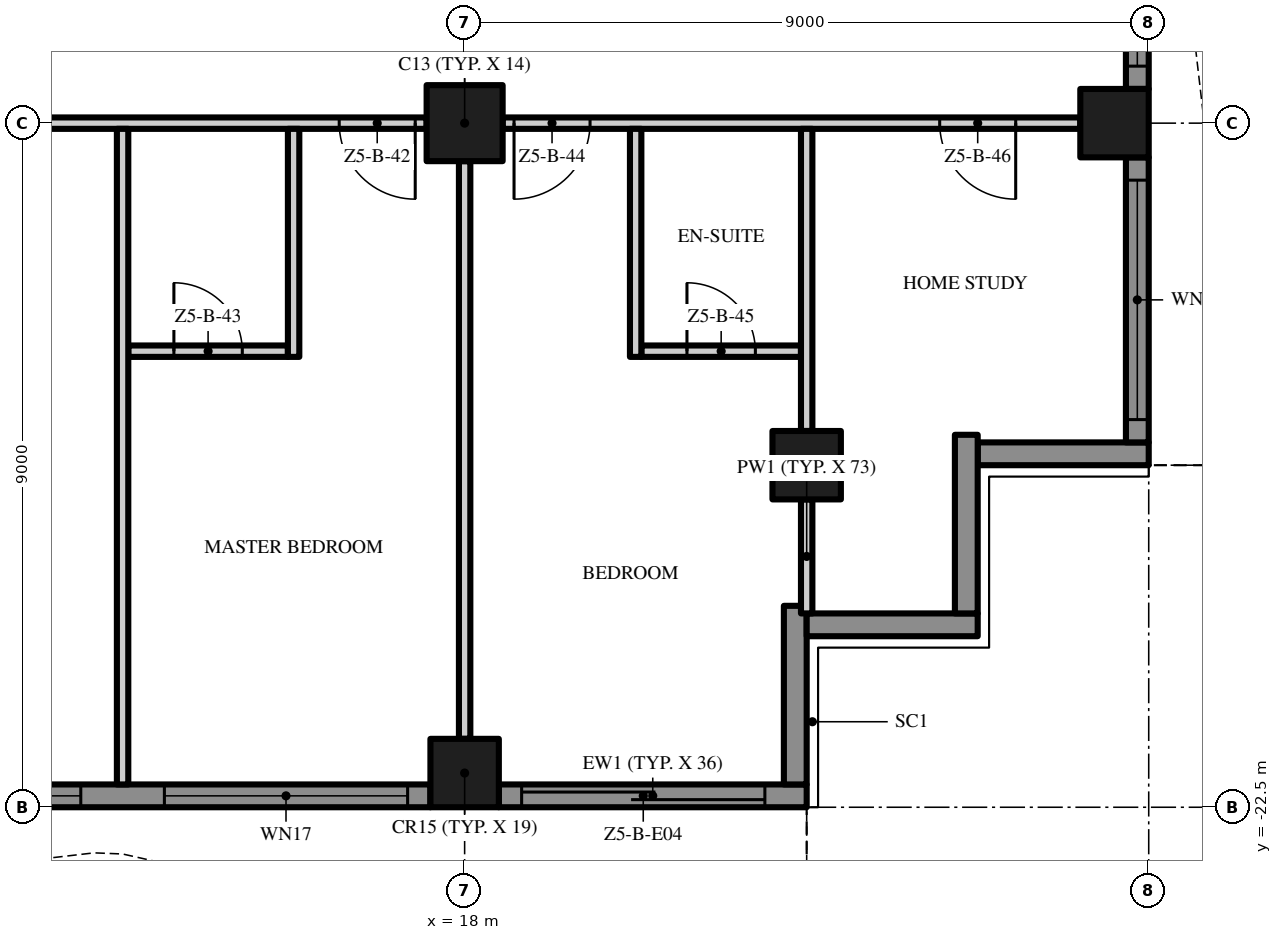
"""IFC4 building model, lengths in metres.
Left out: names, types, materials, properties, quantities, classifications, styles, units other than length and angle.
Written with IfcOpenShell. Run it as: python <this file> out.ifc"""

import sys

from ifc_helpers import new_model, si_unit, direction, frame, frame_2d, origin, origin_2d, place, context, subcontext, project, spatial, polyline, rectangle, outline, extrude, element, fill, save


model = new_model("IFC4")
c1 = context("Model", 3, precision=1e-05, world=origin(), true_north=direction((0.0, 1.0)))
c2 = subcontext(c1, "Body", "Model", "MODEL_VIEW")
j1 = project(units=[si_unit("LENGTHUNIT", "METRE"), si_unit("PLANEANGLEUNIT", "RADIAN")], contexts=[c1])
p1 = place(None, origin())
s1 = spatial("IfcSite", under=j1, at=p1, CompositionType="ELEMENT")
p2 = place(p1, origin())
s2 = spatial("IfcBuilding", under=s1, at=p2, CompositionType="ELEMENT")
p3 = place(p2, frame((0.0, 0.0, 254.0)))
s3 = spatial("IfcBuildingStorey", under=s2, at=p3, CompositionType="ELEMENT", Elevation=254.0)
p4 = place(p3, frame((18.0, -13.5, 0.0), z_axis=(0.0, 0.0, 1.0), x_axis=(1.0, 0.0, 0.0)))
e1 = element("IfcColumn", 1, at=p4, inside=s3, PredefinedType="COLUMN", context=c2, shape_type="SweptSolid", body=[
    extrude(rectangle(XDim=1.0, YDim=1.0, at=origin_2d()), origin(), (0.0, 0.0, 1.0), 3.5),
])
for number, where, z_axis, x_axis in (
    (2, (18.0, -22.05, 0.0), (0.0, 0.0, 1.0), (1.0, 0.0, 0.0)),
    (3, (26.55, -13.5, 0.0), (0.0, 0.0, 1.0), (1.0, 0.0, 0.0)),
    (4, (22.5, -18.0, 0.0), (0.0, 0.0, 1.0), (1.0, 0.0, 0.0)),
):
    element("IfcColumn", number, at=place(p3, frame(where, z_axis=z_axis, x_axis=x_axis)), inside=s3, PredefinedType="COLUMN", context=c2, shape_type="SweptSolid", body=[
        extrude(rectangle(XDim=0.9, YDim=0.9, at=origin_2d()), origin(), (0.0, 0.0, 1.0), 3.5),
    ])
p5 = place(p3, frame((17.55, -22.35, 0.0), z_axis=(0.0, 0.0, 1.0), x_axis=(-1.0, 0.0, 0.0)))
e5 = element("IfcWall", 5, at=p5, inside=s3, PredefinedType="SOLIDWALL", context=c2, shape_type="SweptSolid", body=[
    extrude(rectangle(XDim=8.1, YDim=0.3, at=frame_2d((4.05, 0.0))), origin(), (0.0, 0.0, 1.0), 3.5),
])
p6 = place(p5, frame((4.6, 0.0, 0.45)))
e6 = element("IfcOpeningElement", 6, at=p6, cuts=e5, PredefinedType="OPENING", context=c2, shape_type="SweptSolid", body=[
    extrude(rectangle(XDim=3.2, YDim=2.65, at=frame_2d((1.6, 1.325))), frame((0.0, 0.16, 0.0), z_axis=(0.0, -1.0, 0.0), x_axis=(1.0, 0.0, 0.0)), (0.0, 0.0, 1.0), 0.32),
])
p7 = place(p5, frame((0.3, 0.0, 0.45)))
e7 = element("IfcOpeningElement", 7, at=p7, cuts=e5, PredefinedType="OPENING", context=c2, shape_type="SweptSolid", body=[
    extrude(rectangle(XDim=3.2, YDim=2.65, at=frame_2d((1.6, 1.325))), frame((0.0, 0.16, 0.0), z_axis=(0.0, -1.0, 0.0), x_axis=(1.0, 0.0, 0.0)), (0.0, 0.0, 1.0), 0.32),
])
p8 = place(p3, frame((22.5, -22.35, 0.0), z_axis=(0.0, 0.0, 1.0), x_axis=(-1.0, 0.0, 0.0)))
e8 = element("IfcWall", 8, at=p8, inside=s3, PredefinedType="SOLIDWALL", context=c2, shape_type="SweptSolid", body=[
    extrude(rectangle(XDim=4.05, YDim=0.3, at=frame_2d((2.025, 0.0))), origin(), (0.0, 0.0, 1.0), 3.5),
])
p9 = place(p8, frame((0.55, 0.0, 0.0)))
e9 = element("IfcOpeningElement", 9, at=p9, cuts=e8, PredefinedType="OPENING", context=c2, shape_type="SweptSolid", body=[
    extrude(rectangle(XDim=3.2, YDim=2.4, at=frame_2d((1.6, 1.2))), frame((0.0, 0.16, 0.0), z_axis=(0.0, -1.0, 0.0), x_axis=(1.0, 0.0, 0.0)), (0.0, 0.0, 1.0), 0.32),
])
p10 = place(p3, frame((22.35, -19.85, 0.0), z_axis=(0.0, 0.0, 1.0), x_axis=(0.0, -1.0, 0.0)))
e10 = element("IfcWall", 10, at=p10, inside=s3, PredefinedType="SOLIDWALL", context=c2, shape_type="SweptSolid", body=[
    extrude(rectangle(XDim=2.35, YDim=0.3, at=frame_2d((1.175, 0.0))), origin(), (0.0, 0.0, 1.0), 3.5),
])
p11 = place(p3, frame((24.75, -20.1, 0.0), z_axis=(0.0, 0.0, 1.0), x_axis=(-1.0, 0.0, 0.0)))
e11 = element("IfcWall", 11, at=p11, inside=s3, PredefinedType="SOLIDWALL", context=c2, shape_type="SweptSolid", body=[
    extrude(rectangle(XDim=2.25, YDim=0.3, at=frame_2d((1.125, 0.0))), origin(), (0.0, 0.0, 1.0), 3.5),
])
p12 = place(p3, frame((24.6, -17.6, 0.0), z_axis=(0.0, 0.0, 1.0), x_axis=(0.0, -1.0, 0.0)))
e12 = element("IfcWall", 12, at=p12, inside=s3, PredefinedType="SOLIDWALL", context=c2, shape_type="SweptSolid", body=[
    extrude(rectangle(XDim=2.35, YDim=0.3, at=frame_2d((1.175, 0.0))), origin(), (0.0, 0.0, 1.0), 3.5),
])
p13 = place(p3, frame((27.0, -17.85, 0.0), z_axis=(0.0, 0.0, 1.0), x_axis=(-1.0, 0.0, 0.0)))
e13 = element("IfcWall", 13, at=p13, inside=s3, PredefinedType="SOLIDWALL", context=c2, shape_type="SweptSolid", body=[
    extrude(rectangle(XDim=2.25, YDim=0.3, at=frame_2d((1.125, 0.0))), origin(), (0.0, 0.0, 1.0), 3.5),
])
p14 = place(p3, frame((26.85, -13.95, 0.0), z_axis=(0.0, 0.0, 1.0), x_axis=(0.0, -1.0, 0.0)))
e14 = element("IfcWall", 14, at=p14, inside=s3, PredefinedType="SOLIDWALL", context=c2, shape_type="SweptSolid", body=[
    extrude(rectangle(XDim=3.75, YDim=0.3, at=frame_2d((1.875, 0.0))), origin(), (0.0, 0.0, 1.0), 3.5),
])
p15 = place(p14, frame((0.3, 0.0, 0.45)))
e15 = element("IfcOpeningElement", 15, at=p15, cuts=e14, PredefinedType="OPENING", context=c2, shape_type="SweptSolid", body=[
    extrude(rectangle(XDim=3.15, YDim=2.65, at=frame_2d((1.575, 1.325))), frame((0.0, 0.16, 0.0), z_axis=(0.0, -1.0, 0.0), x_axis=(1.0, 0.0, 0.0)), (0.0, 0.0, 1.0), 0.32),
])
p16 = place(p3, frame((26.85, -4.95, 0.0), z_axis=(0.0, 0.0, 1.0), x_axis=(0.0, -1.0, 0.0)))
e16 = element("IfcWall", 16, at=p16, inside=s3, PredefinedType="SOLIDWALL", context=c2, shape_type="SweptSolid", body=[
    extrude(rectangle(XDim=8.1, YDim=0.3, at=frame_2d((4.05, 0.0))), origin(), (0.0, 0.0, 1.0), 3.5),
])
p17 = place(p16, frame((4.6, 0.0, 0.45)))
e17 = element("IfcOpeningElement", 17, at=p17, cuts=e16, PredefinedType="OPENING", context=c2, shape_type="SweptSolid", body=[
    extrude(rectangle(XDim=3.2, YDim=2.65, at=frame_2d((1.6, 1.325))), frame((0.0, 0.16, 0.0), z_axis=(0.0, -1.0, 0.0), x_axis=(1.0, 0.0, 0.0)), (0.0, 0.0, 1.0), 0.32),
])
p18 = place(p16, frame((0.3, 0.0, 0.0)))
e18 = element("IfcOpeningElement", 18, at=p18, cuts=e16, PredefinedType="OPENING", context=c2, shape_type="SweptSolid", body=[
    extrude(rectangle(XDim=3.2, YDim=2.4, at=frame_2d((1.6, 1.2))), frame((0.0, 0.16, 0.0), z_axis=(0.0, -1.0, 0.0), x_axis=(1.0, 0.0, 0.0)), (0.0, 0.0, 1.0), 0.32),
])
p19 = place(p3, origin())
e19 = element("IfcWall", 19, at=p19, inside=s3, PredefinedType="USERDEFINED", context=c2, shape_type="SweptSolid", body=[
    extrude(outline(polyline([(-22.5, -25.149), (-21.0, -24.488), (-19.5, -23.755), (-18.0, -23.231), (-16.875, -23.1), (-16.5, -23.115), (-15.0, -23.451), (-13.5, -24.112), (-12.0, -24.845), (-10.5, -25.369), (-9.375, -25.5), (-9.0, -25.485), (-7.5, -25.149), (-6.0, -24.488), (-4.5, -23.755), (-3.0, -23.231), (-1.875, -23.1), (-1.5, -23.115), (0.0, -23.451), (1.5, -24.112), (3.0, -24.845), (4.5, -25.369), (5.625, -25.5), (6.0, -25.485), (7.5, -25.149), (9.0, -24.488), (10.5, -23.755), (12.0, -23.231), (13.125, -23.1), (13.5, -23.115), (15.0, -23.451), (16.5, -24.112), (18.0, -24.845), (19.5, -25.369), (20.625, -25.5), (21.0, -25.485), (22.5, -25.149), (22.445, -24.905), (20.967, -25.236), (20.635, -25.249), (19.556, -25.124), (18.096, -24.614), (16.605, -23.885), (15.079, -23.213), (13.533, -22.866), (13.115, -22.849), (11.944, -22.986), (10.404, -23.524), (8.895, -24.261), (7.421, -24.91), (5.967, -25.236), (5.635, -25.249), (4.556, -25.124), (3.096, -24.614), (1.605, -23.885), (0.079, -23.213), (-1.467, -22.866), (-1.885, -22.849), (-3.056, -22.986), (-4.596, -23.524), (-6.105, -24.261), (-7.579, -24.91), (-9.033, -25.236), (-9.365, -25.249), (-10.444, -25.124), (-11.904, -24.614), (-13.395, -23.885), (-14.921, -23.213), (-16.467, -22.866), (-16.885, -22.849), (-18.056, -22.986), (-19.596, -23.524), (-21.105, -24.261), (-22.601, -24.92), (-22.5, -25.149)])), origin(), (0.0, 0.0, 1.0), 0.9),
])
p20 = place(p3, origin())
e20 = element("IfcWall", 20, at=p20, inside=s3, PredefinedType="USERDEFINED", context=c2, shape_type="SweptSolid", body=[
    extrude(outline(polyline([(29.649, -18.0), (28.988, -16.5), (28.255, -15.0), (27.731, -13.5), (27.6, -12.375), (27.615, -12.0), (27.951, -10.5), (28.612, -9.0), (29.345, -7.5), (29.869, -6.0), (30.0, -4.875), (29.985, -4.5), (29.649, -3.0), (28.988, -1.5), (28.255, 0.0), (27.731, 1.5), (27.6, 2.625), (27.615, 3.0), (27.951, 4.5), (28.612, 6.0), (29.345, 7.5), (29.869, 9.0), (30.0, 10.125), (29.985, 10.5), (29.649, 12.0), (28.988, 13.5), (28.255, 15.0), (27.731, 16.5), (27.6, 17.625), (27.615, 18.0), (27.365, 18.01), (27.349, 17.615), (27.486, 16.444), (28.024, 14.904), (28.761, 13.395), (29.41, 11.921), (29.736, 10.467), (29.749, 10.135), (29.624, 9.056), (29.114, 7.596), (28.385, 6.105), (27.713, 4.579), (27.366, 3.033), (27.349, 2.615), (27.486, 1.444), (28.024, -0.096), (28.761, -1.605), (29.41, -3.079), (29.736, -4.533), (29.749, -4.865), (29.624, -5.944), (29.114, -7.404), (28.385, -8.895), (27.713, -10.421), (27.366, -11.967), (27.349, -12.385), (27.486, -13.556), (28.024, -15.096), (28.761, -16.605), (29.42, -18.101), (29.649, -18.0)])), origin(), (0.0, 0.0, 1.0), 0.9),
])
p21 = place(p3, frame((13.575, -16.5, 0.0), z_axis=(0.0, 0.0, 1.0), x_axis=(1.0, 0.0, 0.0)))
e21 = element("IfcWall", 21, at=p21, inside=s3, PredefinedType="PARTITIONING", context=c2, shape_type="SweptSolid", body=[
    extrude(rectangle(XDim=2.1, YDim=0.15, at=frame_2d((1.05, 0.0))), origin(), (0.0, 0.0, 1.0), 3.5),
])
p22 = place(p21, frame((0.6, 0.0, 0.0)))
e22 = element("IfcOpeningElement", 22, at=p22, cuts=e21, PredefinedType="OPENING", context=c2, shape_type="SweptSolid", body=[
    extrude(rectangle(XDim=0.9, YDim=2.1, at=frame_2d((0.45, 1.05))), frame((0.0, 0.085, 0.0), z_axis=(0.0, -1.0, 0.0), x_axis=(1.0, 0.0, 0.0)), (0.0, 0.0, 1.0), 0.17),
])
p23 = place(p3, frame((20.325, -16.5, 0.0), z_axis=(0.0, 0.0, 1.0), x_axis=(1.0, 0.0, 0.0)))
e23 = element("IfcWall", 23, at=p23, inside=s3, PredefinedType="PARTITIONING", context=c2, shape_type="SweptSolid", body=[
    extrude(rectangle(XDim=2.1, YDim=0.15, at=frame_2d((1.05, 0.0))), origin(), (0.0, 0.0, 1.0), 3.5),
])
p24 = place(p23, frame((0.6, 0.0, 0.0)))
e24 = element("IfcOpeningElement", 24, at=p24, cuts=e23, PredefinedType="OPENING", context=c2, shape_type="SweptSolid", body=[
    extrude(rectangle(XDim=0.9, YDim=2.1, at=frame_2d((0.45, 1.05))), frame((0.0, 0.085, 0.0), z_axis=(0.0, -1.0, 0.0), x_axis=(1.0, 0.0, 0.0)), (0.0, 0.0, 1.0), 0.17),
])
p25 = place(p3, frame((17.5, -13.5, 0.0), z_axis=(0.0, 0.0, 1.0), x_axis=(-1.0, 0.0, 0.0)))
e25 = element("IfcWall", 25, at=p25, inside=s3, PredefinedType="PARTITIONING", context=c2, shape_type="SweptSolid", body=[
    extrude(rectangle(XDim=8.0, YDim=0.15, at=frame_2d((4.0, 0.0))), origin(), (0.0, 0.0, 1.0), 3.5),
])
p26 = place(p25, frame((6.05, 0.0, 0.0)))
e26 = element("IfcOpeningElement", 26, at=p26, cuts=e25, PredefinedType="OPENING", context=c2, shape_type="SweptSolid", body=[
    extrude(rectangle(XDim=1.8, YDim=2.4, at=frame_2d((0.9, 1.2))), frame((0.0, 0.085, 0.0), z_axis=(0.0, -1.0, 0.0), x_axis=(1.0, 0.0, 0.0)), (0.0, 0.0, 1.0), 0.17),
])
p27 = place(p25, frame((0.15, 0.0, 0.0)))
e27 = element("IfcOpeningElement", 27, at=p27, cuts=e25, PredefinedType="OPENING", context=c2, shape_type="SweptSolid", body=[
    extrude(rectangle(XDim=1.0, YDim=2.4, at=frame_2d((0.5, 1.2))), frame((0.0, 0.085, 0.0), z_axis=(0.0, -1.0, 0.0), x_axis=(1.0, 0.0, 0.0)), (0.0, 0.0, 1.0), 0.17),
])
p28 = place(p3, frame((26.1, -13.5, 0.0), z_axis=(0.0, 0.0, 1.0), x_axis=(-1.0, 0.0, 0.0)))
e28 = element("IfcWall", 28, at=p28, inside=s3, PredefinedType="PARTITIONING", context=c2, shape_type="SweptSolid", body=[
    extrude(rectangle(XDim=7.6, YDim=0.15, at=frame_2d((3.8, 0.0))), origin(), (0.0, 0.0, 1.0), 3.5),
])
p29 = place(p28, frame((6.45, 0.0, 0.0)))
e29 = element("IfcOpeningElement", 29, at=p29, cuts=e28, PredefinedType="OPENING", context=c2, shape_type="SweptSolid", body=[
    extrude(rectangle(XDim=1.0, YDim=2.4, at=frame_2d((0.5, 1.2))), frame((0.0, 0.085, 0.0), z_axis=(0.0, -1.0, 0.0), x_axis=(1.0, 0.0, 0.0)), (0.0, 0.0, 1.0), 0.17),
])
p30 = place(p28, frame((0.85, 0.0, 0.0)))
e30 = element("IfcOpeningElement", 30, at=p30, cuts=e28, PredefinedType="OPENING", context=c2, shape_type="SweptSolid", body=[
    extrude(rectangle(XDim=1.0, YDim=2.4, at=frame_2d((0.5, 1.2))), frame((0.0, 0.085, 0.0), z_axis=(0.0, -1.0, 0.0), x_axis=(1.0, 0.0, 0.0)), (0.0, 0.0, 1.0), 0.17),
])
p31 = place(p3, frame((13.5, -22.2, 0.0), z_axis=(0.0, 0.0, 1.0), x_axis=(0.0, 1.0, 0.0)))
e31 = element("IfcWall", 31, at=p31, inside=s3, PredefinedType="PARTITIONING", context=c2, shape_type="SweptSolid", body=[
    extrude(rectangle(XDim=8.625, YDim=0.15, at=frame_2d((4.312, 0.0))), origin(), (0.0, 0.0, 1.0), 3.5),
])
p32 = place(p3, frame((15.75, -16.575, 0.0), z_axis=(0.0, 0.0, 1.0), x_axis=(0.0, 1.0, 0.0)))
e32 = element("IfcWall", 32, at=p32, inside=s3, PredefinedType="PARTITIONING", context=c2, shape_type="SweptSolid", body=[
    extrude(rectangle(XDim=3.0, YDim=0.15, at=frame_2d((1.5, 0.0))), origin(), (0.0, 0.0, 1.0), 3.5),
])
p33 = place(p3, frame((18.0, -21.6, 0.0), z_axis=(0.0, 0.0, 1.0), x_axis=(0.0, 1.0, 0.0)))
e33 = element("IfcWall", 33, at=p33, inside=s3, PredefinedType="PARTITIONING", context=c2, shape_type="SweptSolid", body=[
    extrude(rectangle(XDim=7.6, YDim=0.15, at=frame_2d((3.8, 0.0))), origin(), (0.0, 0.0, 1.0), 3.5),
])
p34 = place(p3, frame((20.25, -16.575, 0.0), z_axis=(0.0, 0.0, 1.0), x_axis=(0.0, 1.0, 0.0)))
e34 = element("IfcWall", 34, at=p34, inside=s3, PredefinedType="PARTITIONING", context=c2, shape_type="SweptSolid", body=[
    extrude(rectangle(XDim=3.0, YDim=0.15, at=frame_2d((1.5, 0.0))), origin(), (0.0, 0.0, 1.0), 3.5),
])
p35 = place(p3, frame((22.5, -19.95, 0.0), z_axis=(0.0, 0.0, 1.0), x_axis=(0.0, 1.0, 0.0)))
e35 = element("IfcWall", 35, at=p35, inside=s3, PredefinedType="PARTITIONING", context=c2, shape_type="SweptSolid", body=[
    extrude(rectangle(XDim=1.5, YDim=0.15, at=frame_2d((0.75, 0.0))), origin(), (0.0, 0.0, 1.0), 3.5),
])
p36 = place(p3, frame((22.5, -17.55, 0.0), z_axis=(0.0, 0.0, 1.0), x_axis=(0.0, 1.0, 0.0)))
e36 = element("IfcWall", 36, at=p36, inside=s3, PredefinedType="PARTITIONING", context=c2, shape_type="SweptSolid", body=[
    extrude(rectangle(XDim=3.975, YDim=0.15, at=frame_2d((1.988, 0.0))), origin(), (0.0, 0.0, 1.0), 3.5),
])
p37 = place(p6, origin())
e37 = element("IfcWindow", 37, at=p37, inside=s3, PartitioningType="SINGLE_PANEL", PredefinedType="WINDOW", context=c2, shape_type="SweptSolid", body=[
    extrude(rectangle(XDim=3.2, YDim=2.65, at=frame_2d((1.6, 1.325))), frame((0.0, 0.03, 0.0), z_axis=(0.0, -1.0, 0.0), x_axis=(1.0, 0.0, 0.0)), (0.0, 0.0, 1.0), 0.06),
])
fill(e6, e37)
p38 = place(p7, origin())
e38 = element("IfcWindow", 38, at=p38, inside=s3, PartitioningType="SINGLE_PANEL", PredefinedType="WINDOW", context=c2, shape_type="SweptSolid", body=[
    extrude(rectangle(XDim=3.2, YDim=2.65, at=frame_2d((1.6, 1.325))), frame((0.0, 0.03, 0.0), z_axis=(0.0, -1.0, 0.0), x_axis=(1.0, 0.0, 0.0)), (0.0, 0.0, 1.0), 0.06),
])
fill(e7, e38)
p39 = place(p9, origin())
e39 = element("IfcDoor", 39, at=p39, inside=s3, OperationType="SINGLE_SWING_LEFT", PredefinedType="DOOR", context=c2, shape_type="SweptSolid", body=[
    extrude(rectangle(XDim=3.2, YDim=2.4, at=frame_2d((1.6, 1.2))), frame((0.0, 0.025, 0.0), z_axis=(0.0, -1.0, 0.0), x_axis=(1.0, 0.0, 0.0)), (0.0, 0.0, 1.0), 0.05),
])
fill(e9, e39)
p40 = place(p15, origin())
e40 = element("IfcWindow", 40, at=p40, inside=s3, PartitioningType="SINGLE_PANEL", PredefinedType="WINDOW", context=c2, shape_type="SweptSolid", body=[
    extrude(rectangle(XDim=3.15, YDim=2.65, at=frame_2d((1.575, 1.325))), frame((0.0, 0.03, 0.0), z_axis=(0.0, -1.0, 0.0), x_axis=(1.0, 0.0, 0.0)), (0.0, 0.0, 1.0), 0.06),
])
fill(e15, e40)
p41 = place(p17, origin())
e41 = element("IfcWindow", 41, at=p41, inside=s3, PartitioningType="SINGLE_PANEL", PredefinedType="WINDOW", context=c2, shape_type="SweptSolid", body=[
    extrude(rectangle(XDim=3.2, YDim=2.65, at=frame_2d((1.6, 1.325))), frame((0.0, 0.03, 0.0), z_axis=(0.0, -1.0, 0.0), x_axis=(1.0, 0.0, 0.0)), (0.0, 0.0, 1.0), 0.06),
])
fill(e17, e41)
p42 = place(p27, origin())
e42 = element("IfcDoor", 42, at=p42, inside=s3, OperationType="SINGLE_SWING_LEFT", PredefinedType="DOOR", context=c2, shape_type="SweptSolid", body=[
    extrude(rectangle(XDim=1.0, YDim=2.4, at=frame_2d((0.5, 1.2))), frame((0.0, 0.025, 0.0), z_axis=(0.0, -1.0, 0.0), x_axis=(1.0, 0.0, 0.0)), (0.0, 0.0, 1.0), 0.05),
])
fill(e27, e42)
p43 = place(p22, origin())
e43 = element("IfcDoor", 43, at=p43, inside=s3, OperationType="SINGLE_SWING_LEFT", PredefinedType="DOOR", context=c2, shape_type="SweptSolid", body=[
    extrude(rectangle(XDim=0.9, YDim=2.1, at=frame_2d((0.45, 1.05))), frame((0.0, 0.025, 0.0), z_axis=(0.0, -1.0, 0.0), x_axis=(1.0, 0.0, 0.0)), (0.0, 0.0, 1.0), 0.05),
])
fill(e22, e43)
p44 = place(p29, origin())
e44 = element("IfcDoor", 44, at=p44, inside=s3, OperationType="SINGLE_SWING_RIGHT", PredefinedType="DOOR", context=c2, shape_type="SweptSolid", body=[
    extrude(rectangle(XDim=1.0, YDim=2.4, at=frame_2d((0.5, 1.2))), frame((0.0, 0.025, 0.0), z_axis=(0.0, -1.0, 0.0), x_axis=(1.0, 0.0, 0.0)), (0.0, 0.0, 1.0), 0.05),
])
fill(e29, e44)
p45 = place(p24, origin())
e45 = element("IfcDoor", 45, at=p45, inside=s3, OperationType="SINGLE_SWING_LEFT", PredefinedType="DOOR", context=c2, shape_type="SweptSolid", body=[
    extrude(rectangle(XDim=0.9, YDim=2.1, at=frame_2d((0.45, 1.05))), frame((0.0, 0.025, 0.0), z_axis=(0.0, -1.0, 0.0), x_axis=(1.0, 0.0, 0.0)), (0.0, 0.0, 1.0), 0.05),
])
fill(e24, e45)
p46 = place(p30, origin())
e46 = element("IfcDoor", 46, at=p46, inside=s3, OperationType="SINGLE_SWING_LEFT", PredefinedType="DOOR", context=c2, shape_type="SweptSolid", body=[
    extrude(rectangle(XDim=1.0, YDim=2.4, at=frame_2d((0.5, 1.2))), frame((0.0, 0.025, 0.0), z_axis=(0.0, -1.0, 0.0), x_axis=(1.0, 0.0, 0.0)), (0.0, 0.0, 1.0), 0.05),
])
fill(e30, e46)
save(model, sys.argv[1])
